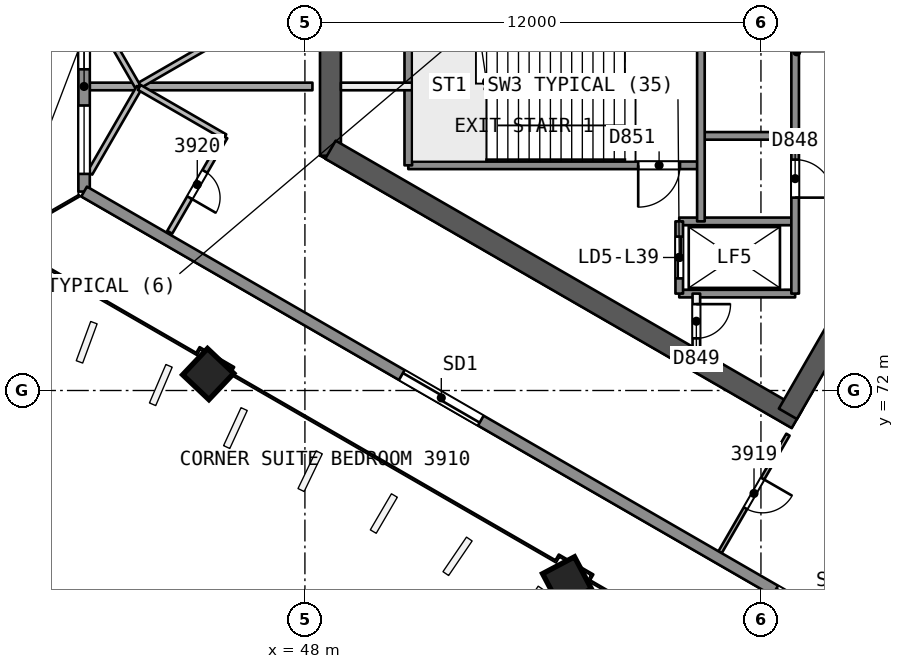
"""IFC4 building model, lengths in metres.
Left out: names, types, materials, properties, quantities, classifications, styles, units other than length and angle.
Written with IfcOpenShell. Run it as: python <this file> out.ifc"""

import sys

from ifc_helpers import new_model, si_unit, direction, frame, frame_2d, origin, origin_2d, place, context, subcontext, project, spatial, rectangle, extrude, element, fill, save


model = new_model("IFC4")
c1 = context("Model", 3, precision=1e-05, world=origin(), true_north=direction((0.0, 1.0)))
c2 = subcontext(c1, "Body", "Model", "MODEL_VIEW")
j1 = project(units=[si_unit("LENGTHUNIT", "METRE"), si_unit("PLANEANGLEUNIT", "RADIAN")], contexts=[c1])
p1 = place(None, origin())
s1 = spatial("IfcSite", under=j1, at=p1, CompositionType="ELEMENT")
p2 = place(p1, origin())
s2 = spatial("IfcBuilding", under=s1, at=p2, CompositionType="ELEMENT")
p3 = place(p2, frame((0.0, 0.0, 163.7)))
s3 = spatial("IfcBuildingStorey", under=s2, at=p3, CompositionType="ELEMENT", Elevation=163.7)
p4 = place(p3, frame((65.682, 80.0, 0.0), z_axis=(0.0, 0.0, 1.0), x_axis=(-0.500000202252, 0.866025287014, 0.0)))
e1 = element("IfcWall", 1, at=p4, inside=s3, PredefinedType="SHEAR", context=c2, shape_type="SweptSolid", body=[
    extrude(rectangle(XDim=10.221, YDim=0.55, at=frame_2d((5.111, 0.0))), origin(), (0.0, 0.0, 1.0), 3.7),
])
p5 = place(p4, frame((0.791, 0.0, 0.0)))
e2 = element("IfcOpeningElement", 2, at=p5, cuts=e1, PredefinedType="OPENING", context=c2, shape_type="SweptSolid", body=[
    extrude(rectangle(XDim=1.2, YDim=2.1, at=frame_2d((0.6, 1.05))), frame((0.0, 0.286, 0.0), z_axis=(0.0, -1.0, 0.0), x_axis=(1.0, 0.0, 0.0)), (0.0, 0.0, 1.0), 0.571),
])
p6 = place(p3, frame((48.672, 81.664, 0.0), z_axis=(0.0, 0.0, 1.0), x_axis=(0.0, -1.0, 0.0)))
e3 = element("IfcWall", 3, at=p6, inside=s3, PredefinedType="SHEAR", context=c2, shape_type="SweptSolid", body=[
    extrude(rectangle(XDim=3.487, YDim=0.55, at=frame_2d((1.743, 0.0))), origin(), (0.0, 0.0, 1.0), 3.7),
])
p7 = place(p3, frame((48.672, 78.336, 0.0), z_axis=(0.0, 0.0, 1.0), x_axis=(0.866023530946, -0.500003243837, 0.0)))
e4 = element("IfcWall", 4, at=p7, inside=s3, PredefinedType="SHEAR", context=c2, shape_type="SweptSolid", body=[
    extrude(rectangle(XDim=14.175, YDim=0.55, at=frame_2d((7.087, 0.0))), origin(), (0.0, 0.0, 1.0), 3.7),
])
p8 = place(p3, frame((60.709, 71.386, 0.0), z_axis=(0.0, 0.0, 1.0), x_axis=(0.500015938302, 0.866016201606, 0.0)))
e5 = element("IfcWall", 5, at=p8, inside=s3, PredefinedType="SHEAR", context=c2, shape_type="SweptSolid", body=[
    extrude(rectangle(XDim=10.105, YDim=0.55, at=frame_2d((5.053, 0.0))), origin(), (0.0, 0.0, 1.0), 3.7),
])
p9 = place(p8, frame((7.955, 0.0, 0.0)))
e6 = element("IfcOpeningElement", 6, at=p9, cuts=e5, PredefinedType="OPENING", context=c2, shape_type="SweptSolid", body=[
    extrude(rectangle(XDim=1.2, YDim=2.1, at=frame_2d((0.6, 1.05))), frame((0.0, 0.286, 0.0), z_axis=(0.0, -1.0, 0.0), x_axis=(1.0, 0.0, 0.0)), (0.0, 0.0, 1.0), 0.571),
])
p10 = place(p3, frame((45.421, 72.424, 0.0), z_axis=(0.028559101991, 0.006859460986, 0.999568569678), x_axis=(-0.866414848315, 0.498869008806, 0.021331260469)))
e7 = element("IfcColumn", 7, at=p10, inside=s3, PredefinedType="COLUMN", context=c2, shape_type="SweptSolid", body=[
    extrude(rectangle(XDim=0.95, YDim=0.95, at=origin_2d()), origin(), (0.0, 0.0, 1.0), 3.702),
])
p11 = place(p3, frame((54.873, 66.967, 0.0), z_axis=(0.019328516974, 0.012138044789, 0.999739504221), x_axis=(-0.865690909737, 0.500465383244, 0.010660627254)))
e8 = element("IfcColumn", 8, at=p11, inside=s3, PredefinedType="COLUMN", context=c2, shape_type="SweptSolid", body=[
    extrude(rectangle(XDim=0.95, YDim=0.95, at=origin_2d()), origin(), (0.0, 0.0, 1.0), 3.701),
])
p12 = place(p3, frame((45.85, 81.301, 0.0), z_axis=(0.0, 0.0, 1.0), x_axis=(-0.866021400173, -0.500006934395, 0.0)))
e9 = element("IfcWall", 9, at=p12, inside=s3, PredefinedType="PARTITIONING", context=c2, shape_type="SweptSolid", body=[
    extrude(rectangle(XDim=2.6, YDim=0.15, at=frame_2d((1.3, 0.0))), origin(), (0.0, 0.0, 1.0), 3.25),
])
p13 = place(p3, frame((43.598, 80.001, 0.0), z_axis=(0.0, 0.0, 1.0), x_axis=(-0.500024252353, 0.866011401229, 0.0)))
e10 = element("IfcWall", 10, at=p13, inside=s3, PredefinedType="PARTITIONING", context=c2, shape_type="SweptSolid", body=[
    extrude(rectangle(XDim=2.521, YDim=0.15, at=frame_2d((1.26, 0.0))), origin(), (0.0, 0.0, 1.0), 3.25),
])
p14 = place(p3, frame((42.338, 80.0, 0.0), z_axis=(0.0, 0.0, 1.0), x_axis=(1.0, 0.0, 0.0)))
e11 = element("IfcWall", 11, at=p14, inside=s3, PredefinedType="PARTITIONING", context=c2, shape_type="SweptSolid", body=[
    extrude(rectangle(XDim=5.86, YDim=0.2, at=frame_2d((2.93, 0.0))), origin(), (0.0, 0.0, 1.0), 3.25),
])
p15 = place(p3, frame((60.71, 70.838, 0.0), z_axis=(0.0, 0.0, 1.0), x_axis=(-0.4999827131, -0.866035384151, 0.0)))
e12 = element("IfcWall", 12, at=p15, inside=s3, PredefinedType="PARTITIONING", context=c2, shape_type="SweptSolid", body=[
    extrude(rectangle(XDim=3.573, YDim=0.1, at=frame_2d((1.787, 0.0))), origin(), (0.0, 0.0, 1.0), 3.25),
])
p16 = place(p15, frame((1.336, 0.0, 0.0)))
e13 = element("IfcOpeningElement", 13, at=p16, cuts=e12, PredefinedType="OPENING", context=c2, shape_type="SweptSolid", body=[
    extrude(rectangle(XDim=0.9, YDim=2.1, at=frame_2d((0.45, 1.05))), frame((0.0, 0.061, 0.0), z_axis=(0.0, -1.0, 0.0), x_axis=(1.0, 0.0, 0.0)), (0.0, 0.0, 1.0), 0.121),
])
p17 = place(p3, frame((42.338, 77.718, 0.0), z_axis=(0.0, 0.0, 1.0), x_axis=(0.499998180979, 0.866026453994, 0.0)))
e14 = element("IfcWall", 14, at=p17, inside=s3, PredefinedType="PARTITIONING", context=c2, shape_type="SweptSolid", body=[
    extrude(rectangle(XDim=2.606, YDim=0.15, at=frame_2d((1.303, 0.0))), origin(), (0.0, 0.0, 1.0), 3.25),
])
p18 = place(p3, frame((43.641, 79.975, 0.0), z_axis=(0.0, 0.0, 1.0), x_axis=(0.866021400173, -0.500006934395, 0.0)))
e15 = element("IfcWall", 15, at=p18, inside=s3, PredefinedType="PARTITIONING", context=c2, shape_type="SweptSolid", body=[
    extrude(rectangle(XDim=2.6, YDim=0.15, at=frame_2d((1.3, 0.0))), origin(), (0.0, 0.0, 1.0), 3.25),
])
p19 = place(p3, frame((45.893, 78.675, 0.0), z_axis=(0.0, 0.0, 1.0), x_axis=(-0.499987231761, -0.866032775405, 0.0)))
e16 = element("IfcWall", 16, at=p19, inside=s3, PredefinedType="PARTITIONING", context=c2, shape_type="SweptSolid", body=[
    extrude(rectangle(XDim=2.9, YDim=0.15, at=frame_2d((1.45, 0.0))), origin(), (0.0, 0.0, 1.0), 3.25),
])
p20 = place(p19, frame((1.05, 0.0, 0.0)))
e17 = element("IfcOpeningElement", 17, at=p20, cuts=e16, PredefinedType="OPENING", context=c2, shape_type="SweptSolid", body=[
    extrude(rectangle(XDim=0.8, YDim=2.1, at=frame_2d((0.4, 1.05))), frame((0.0, 0.085, 0.0), z_axis=(0.0, -1.0, 0.0), x_axis=(1.0, 0.0, 0.0)), (0.0, 0.0, 1.0), 0.171),
])
p21 = place(p3, frame((42.189, 77.234, 0.0), z_axis=(0.0, 0.0, 1.0), x_axis=(0.0, 1.0, 0.0)))
e18 = element("IfcWall", 18, at=p21, inside=s3, PredefinedType="SOLIDWALL", context=c2, shape_type="SweptSolid", body=[
    extrude(rectangle(XDim=5.532, YDim=0.3, at=frame_2d((2.766, 0.0))), origin(), (0.0, 0.0, 1.0), 3.25),
])
p22 = place(p21, frame((3.217, 0.0, 0.9)))
e19 = element("IfcOpeningElement", 19, at=p22, cuts=e18, PredefinedType="OPENING", context=c2, shape_type="SweptSolid", body=[
    extrude(rectangle(XDim=1.8, YDim=1.5, at=frame_2d((0.9, 0.75))), frame((0.0, 0.161, 0.0), z_axis=(0.0, -1.0, 0.0), x_axis=(1.0, 0.0, 0.0)), (0.0, 0.0, 1.0), 0.321),
])
p23 = place(p21, frame((0.465, 0.0, 0.9)))
e20 = element("IfcOpeningElement", 20, at=p23, cuts=e18, PredefinedType="OPENING", context=c2, shape_type="SweptSolid", body=[
    extrude(rectangle(XDim=1.8, YDim=1.5, at=frame_2d((0.9, 0.75))), frame((0.0, 0.161, 0.0), z_axis=(0.0, -1.0, 0.0), x_axis=(1.0, 0.0, 0.0)), (0.0, 0.0, 1.0), 0.321),
])
p24 = place(p3, frame((89.01, 50.202, 0.0), z_axis=(0.0, 0.0, 1.0), x_axis=(-0.866025862562, 0.499999205373, 0.0)))
e21 = element("IfcWall", 21, at=p24, inside=s3, PredefinedType="SOLIDWALL", context=c2, shape_type="SweptSolid", body=[
    extrude(rectangle(XDim=54.064, YDim=0.3, at=frame_2d((27.032, 0.0))), origin(), (0.0, 0.0, 1.0), 3.25),
])
p25 = place(p24, frame((30.665, 0.0, 0.0)))
e22 = element("IfcOpeningElement", 22, at=p25, cuts=e21, PredefinedType="OPENING", context=c2, shape_type="SweptSolid", body=[
    extrude(rectangle(XDim=2.4, YDim=2.4, at=frame_2d((1.2, 1.2))), frame((0.0, 0.161, 0.0), z_axis=(0.0, -1.0, 0.0), x_axis=(1.0, 0.0, 0.0)), (0.0, 0.0, 1.0), 0.321),
])
p26 = place(p24, frame((42.011, 0.0, 0.0)))
e23 = element("IfcOpeningElement", 23, at=p26, cuts=e21, PredefinedType="OPENING", context=c2, shape_type="SweptSolid", body=[
    extrude(rectangle(XDim=2.4, YDim=2.4, at=frame_2d((1.2, 1.2))), frame((0.0, 0.161, 0.0), z_axis=(0.0, -1.0, 0.0), x_axis=(1.0, 0.0, 0.0)), (0.0, 0.0, 1.0), 0.321),
])
p27 = place(p24, frame((10.402, 0.0, 0.0)))
e24 = element("IfcOpeningElement", 24, at=p27, cuts=e21, PredefinedType="OPENING", context=c2, shape_type="SweptSolid", body=[
    extrude(rectangle(XDim=2.4, YDim=2.4, at=frame_2d((1.2, 1.2))), frame((0.0, 0.161, 0.0), z_axis=(0.0, -1.0, 0.0), x_axis=(1.0, 0.0, 0.0)), (0.0, 0.0, 1.0), 0.321),
])
p28 = place(p24, frame((25.197, 0.0, 0.9)))
e25 = element("IfcOpeningElement", 25, at=p28, cuts=e21, PredefinedType="OPENING", context=c2, shape_type="SweptSolid", body=[
    extrude(rectangle(XDim=1.8, YDim=1.5, at=frame_2d((0.9, 0.75))), frame((0.0, 0.161, 0.0), z_axis=(0.0, -1.0, 0.0), x_axis=(1.0, 0.0, 0.0)), (0.0, 0.0, 1.0), 0.321),
])
p29 = place(p3, frame((50.82, 80.0, 0.0), z_axis=(0.0, 0.0, 1.0), x_axis=(-1.0, 0.0, 0.0)))
e26 = element("IfcWall", 26, at=p29, inside=s3, PredefinedType="PARTITIONING", context=c2, shape_type="SweptSolid", body=[
    extrude(rectangle(XDim=1.873, YDim=0.2, at=frame_2d((0.937, 0.0))), origin(), (0.0, 0.0, 1.0), 3.25),
])
p30 = place(p3, frame((60.9, 78.7, 0.0), z_axis=(0.0, 0.0, 1.0), x_axis=(-1.0, 0.0, 0.0)))
e27 = element("IfcWall", 27, at=p30, inside=s3, PredefinedType="SOLIDWALL", context=c2, shape_type="SweptSolid", body=[
    extrude(rectangle(XDim=2.48, YDim=0.2, at=frame_2d((1.24, 0.0))), origin(), (0.0, 0.0, 1.0), 3.25),
])
p31 = place(p3, frame((58.42, 77.925, 0.0), z_axis=(0.0, 0.0, 1.0), x_axis=(-1.0, 0.0, 0.0)))
e28 = element("IfcWall", 28, at=p31, inside=s3, PredefinedType="SOLIDWALL", context=c2, shape_type="SweptSolid", body=[
    extrude(rectangle(XDim=7.7, YDim=0.2, at=frame_2d((3.85, 0.0))), origin(), (0.0, 0.0, 1.0), 3.25),
])
p32 = place(p31, frame((0.55, 0.0, 0.0)))
e29 = element("IfcOpeningElement", 29, at=p32, cuts=e28, PredefinedType="OPENING", context=c2, shape_type="SweptSolid", body=[
    extrude(rectangle(XDim=1.1, YDim=2.1, at=frame_2d((0.55, 1.05))), frame((0.0, 0.11, 0.0), z_axis=(0.0, -1.0, 0.0), x_axis=(1.0, 0.0, 0.0)), (0.0, 0.0, 1.0), 0.221),
])
for number, where, z_axis, x_axis in (
    (30, (60.9, 76.45, 0.0), (0.0, 0.0, 1.0), (-1.0, 0.0, 0.0)),
    (31, (60.9, 74.55, 0.0), (0.0, 0.0, 1.0), (-1.0, 0.0, 0.0)),
):
    element("IfcWall", number, at=place(p3, frame(where, z_axis=z_axis, x_axis=x_axis)), inside=s3, PredefinedType="SOLIDWALL", context=c2, shape_type="SweptSolid", body=[
        extrude(rectangle(XDim=3.05, YDim=0.2, at=frame_2d((1.525, 0.0))), origin(), (0.0, 0.0, 1.0), 3.25),
    ])
p33 = place(p3, frame((60.9, 85.45, 0.0), z_axis=(0.0, 0.0, 1.0), x_axis=(0.0, -1.0, 0.0)))
e32 = element("IfcWall", 32, at=p33, inside=s3, PredefinedType="SOLIDWALL", context=c2, shape_type="SweptSolid", body=[
    extrude(rectangle(XDim=10.9, YDim=0.2, at=frame_2d((5.45, 0.0))), origin(), (0.0, 0.0, 1.0), 3.25),
])
p34 = place(p33, frame((2.875, 0.0, 0.0)))
e33 = element("IfcOpeningElement", 33, at=p34, cuts=e32, PredefinedType="OPENING", context=c2, shape_type="SweptSolid", body=[
    extrude(rectangle(XDim=1.0, YDim=2.1, at=frame_2d((0.5, 1.05))), frame((0.0, 0.11, 0.0), z_axis=(0.0, -1.0, 0.0), x_axis=(1.0, 0.0, 0.0)), (0.0, 0.0, 1.0), 0.221),
])
p35 = place(p33, frame((7.375, 0.0, 0.0)))
e34 = element("IfcOpeningElement", 34, at=p35, cuts=e32, PredefinedType="OPENING", context=c2, shape_type="SweptSolid", body=[
    extrude(rectangle(XDim=1.0, YDim=2.1, at=frame_2d((0.5, 1.05))), frame((0.0, 0.11, 0.0), z_axis=(0.0, -1.0, 0.0), x_axis=(1.0, 0.0, 0.0)), (0.0, 0.0, 1.0), 0.221),
])
p36 = place(p3, frame((58.42, 86.974, 0.0), z_axis=(0.0, 0.0, 1.0), x_axis=(0.0, -1.0, 0.0)))
e35 = element("IfcWall", 35, at=p36, inside=s3, PredefinedType="SOLIDWALL", context=c2, shape_type="SweptSolid", body=[
    extrude(rectangle(XDim=10.524, YDim=0.2, at=frame_2d((5.262, 0.0))), origin(), (0.0, 0.0, 1.0), 3.25),
])
p37 = place(p36, frame((0.312, 0.0, 0.0)))
e36 = element("IfcOpeningElement", 36, at=p37, cuts=e35, PredefinedType="OPENING", context=c2, shape_type="SweptSolid", body=[
    extrude(rectangle(XDim=0.9, YDim=2.1, at=frame_2d((0.45, 1.05))), frame((0.0, 0.11, 0.0), z_axis=(0.0, -1.0, 0.0), x_axis=(1.0, 0.0, 0.0)), (0.0, 0.0, 1.0), 0.221),
])
p38 = place(p3, frame((58.3, 74.55, 0.0), z_axis=(0.0, 0.0, 1.0), x_axis=(0.0, -1.0, 0.0)))
e37 = element("IfcWall", 37, at=p38, inside=s3, PredefinedType="PARTITIONING", context=c2, shape_type="SweptSolid", body=[
    extrude(rectangle(XDim=1.455, YDim=0.2, at=frame_2d((0.728, 0.0))), origin(), (0.0, 0.0, 1.0), 3.25),
])
p39 = place(p38, frame((0.278, 0.0, 0.0)))
e38 = element("IfcOpeningElement", 38, at=p39, cuts=e37, PredefinedType="OPENING", context=c2, shape_type="SweptSolid", body=[
    extrude(rectangle(XDim=0.9, YDim=2.1, at=frame_2d((0.45, 1.05))), frame((0.0, 0.11, 0.0), z_axis=(0.0, -1.0, 0.0), x_axis=(1.0, 0.0, 0.0)), (0.0, 0.0, 1.0), 0.221),
])
p40 = place(p3, frame((57.85, 76.45, 0.0), z_axis=(0.0, 0.0, 1.0), x_axis=(0.0, -1.0, 0.0)))
e39 = element("IfcWall", 39, at=p40, inside=s3, PredefinedType="SOLIDWALL", context=c2, shape_type="SweptSolid", body=[
    extrude(rectangle(XDim=1.9, YDim=0.2, at=frame_2d((0.95, 0.0))), origin(), (0.0, 0.0, 1.0), 3.25),
])
p41 = place(p40, frame((0.4, 0.0, 0.0)))
e40 = element("IfcOpeningElement", 40, at=p41, cuts=e39, PredefinedType="OPENING", context=c2, shape_type="SweptSolid", body=[
    extrude(rectangle(XDim=1.1, YDim=2.1, at=frame_2d((0.55, 1.05))), frame((0.0, 0.11, 0.0), z_axis=(0.0, -1.0, 0.0), x_axis=(1.0, 0.0, 0.0)), (0.0, 0.0, 1.0), 0.221),
])
p42 = place(p3, frame((50.72, 82.075, 0.0), z_axis=(0.0, 0.0, 1.0), x_axis=(0.0, -1.0, 0.0)))
e41 = element("IfcWall", 41, at=p42, inside=s3, PredefinedType="SOLIDWALL", context=c2, shape_type="SweptSolid", body=[
    extrude(rectangle(XDim=4.15, YDim=0.2, at=frame_2d((2.075, 0.0))), origin(), (0.0, 0.0, 1.0), 3.25),
])
p43 = place(p16, origin())
e42 = element("IfcDoor", 42, at=p43, inside=s3, OperationType="SINGLE_SWING_LEFT", PredefinedType="NOTDEFINED", context=c2, shape_type="SweptSolid", body=[
    extrude(rectangle(XDim=0.9, YDim=2.1, at=frame_2d((0.45, 1.05))), frame((0.0, 0.025, 0.0), z_axis=(0.0, -1.0, 0.0), x_axis=(1.0, 0.0, 0.0)), (0.0, 0.0, 1.0), 0.05),
])
fill(e13, e42)
p44 = place(p20, origin())
e43 = element("IfcDoor", 43, at=p44, inside=s3, OperationType="SINGLE_SWING_RIGHT", PredefinedType="NOTDEFINED", context=c2, shape_type="SweptSolid", body=[
    extrude(rectangle(XDim=0.8, YDim=2.1, at=frame_2d((0.4, 1.05))), frame((0.0, 0.025, 0.0), z_axis=(0.0, -1.0, 0.0), x_axis=(1.0, 0.0, 0.0)), (0.0, 0.0, 1.0), 0.05),
])
fill(e17, e43)
p45 = place(p22, origin())
e44 = element("IfcWindow", 44, at=p45, inside=s3, PartitioningType="SINGLE_PANEL", PredefinedType="WINDOW", context=c2, shape_type="SweptSolid", body=[
    extrude(rectangle(XDim=1.8, YDim=1.5, at=frame_2d((0.9, 0.75))), frame((0.0, 0.03, 0.0), z_axis=(0.0, -1.0, 0.0), x_axis=(1.0, 0.0, 0.0)), (0.0, 0.0, 1.0), 0.06),
])
fill(e19, e44)
p46 = place(p23, origin())
e45 = element("IfcWindow", 45, at=p46, inside=s3, PartitioningType="SINGLE_PANEL", PredefinedType="WINDOW", context=c2, shape_type="SweptSolid", body=[
    extrude(rectangle(XDim=1.8, YDim=1.5, at=frame_2d((0.9, 0.75))), frame((0.0, 0.03, 0.0), z_axis=(0.0, -1.0, 0.0), x_axis=(1.0, 0.0, 0.0)), (0.0, 0.0, 1.0), 0.06),
])
fill(e20, e45)
p47 = place(p26, origin())
e46 = element("IfcDoor", 46, at=p47, inside=s3, OperationType="SLIDING_TO_RIGHT", PredefinedType="NOTDEFINED", context=c2, shape_type="SweptSolid", body=[
    extrude(rectangle(XDim=2.4, YDim=2.4, at=frame_2d((1.2, 1.2))), frame((0.0, 0.025, 0.0), z_axis=(0.0, -1.0, 0.0), x_axis=(1.0, 0.0, 0.0)), (0.0, 0.0, 1.0), 0.05),
])
fill(e23, e46)
p48 = place(p41, origin())
e47 = element("IfcDoor", 47, at=p48, inside=s3, OperationType="SLIDING_TO_RIGHT", PredefinedType="NOTDEFINED", context=c2, shape_type="SweptSolid", body=[
    extrude(rectangle(XDim=1.1, YDim=2.1, at=frame_2d((0.55, 1.05))), frame((0.0, 0.025, 0.0), z_axis=(0.0, -1.0, 0.0), x_axis=(1.0, 0.0, 0.0)), (0.0, 0.0, 1.0), 0.05),
])
fill(e40, e47)
p49 = place(p35, origin())
e48 = element("IfcDoor", 48, at=p49, inside=s3, OperationType="SINGLE_SWING_RIGHT", PredefinedType="NOTDEFINED", context=c2, shape_type="SweptSolid", body=[
    extrude(rectangle(XDim=1.0, YDim=2.1, at=frame_2d((0.5, 1.05))), frame((0.0, 0.025, 0.0), z_axis=(0.0, -1.0, 0.0), x_axis=(1.0, 0.0, 0.0)), (0.0, 0.0, 1.0), 0.05),
])
fill(e34, e48)
p50 = place(p39, origin())
e49 = element("IfcDoor", 49, at=p50, inside=s3, OperationType="SINGLE_SWING_LEFT", PredefinedType="NOTDEFINED", context=c2, shape_type="SweptSolid", body=[
    extrude(rectangle(XDim=0.9, YDim=2.1, at=frame_2d((0.45, 1.05))), frame((0.0, 0.025, 0.0), z_axis=(0.0, -1.0, 0.0), x_axis=(1.0, 0.0, 0.0)), (0.0, 0.0, 1.0), 0.05),
])
fill(e38, e49)
p51 = place(p32, origin())
e50 = element("IfcDoor", 50, at=p51, inside=s3, OperationType="SINGLE_SWING_RIGHT", PredefinedType="NOTDEFINED", context=c2, shape_type="SweptSolid", body=[
    extrude(rectangle(XDim=1.1, YDim=2.1, at=frame_2d((0.55, 1.05))), frame((0.0, 0.025, 0.0), z_axis=(0.0, -1.0, 0.0), x_axis=(1.0, 0.0, 0.0)), (0.0, 0.0, 1.0), 0.05),
])
fill(e29, e50)
save(model, sys.argv[1])
